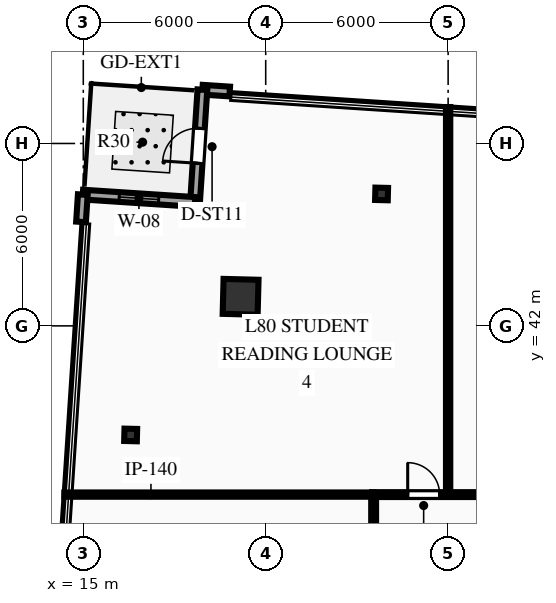
"""IFC4 building model, lengths in metres.
Left out: names, types, materials, properties, quantities, classifications, styles, units other than length and angle.
Written with IfcOpenShell. Run it as: python <this file> out.ifc"""

import sys

from ifc_helpers import new_model, si_unit, direction, frame, frame_2d, origin, origin_2d, place, context, subcontext, project, spatial, rectangle, hollow_rectangle, i_section, extrude, element, fill, save


model = new_model("IFC4")
c1 = context("Model", 3, precision=1e-05, world=origin(), true_north=direction((0.0, 1.0)))
c2 = subcontext(c1, "Body", "Model", "MODEL_VIEW")
j1 = project(units=[si_unit("LENGTHUNIT", "METRE"), si_unit("PLANEANGLEUNIT", "RADIAN")], contexts=[c1])
p1 = place(None, origin())
s1 = spatial("IfcSite", under=j1, at=p1, CompositionType="ELEMENT")
p2 = place(p1, origin())
s2 = spatial("IfcBuilding", under=s1, at=p2, CompositionType="ELEMENT")
p3 = place(p2, frame((0.0, 0.0, 317.7)))
s3 = spatial("IfcBuildingStorey", under=s2, at=p3, CompositionType="ELEMENT", Elevation=317.7)
p4 = place(p3, frame((20.174, 42.956, 0.0), z_axis=(0.0, 0.0, 1.0), x_axis=(0.025304572866, 0.999679788028, 0.0)))
e1 = element("IfcColumn", 1, at=p4, inside=s3, PredefinedType="COLUMN", context=c2, shape_type="SweptSolid", body=[
    extrude(hollow_rectangle(XDim=1.15, YDim=1.15, WallThickness=0.05, at=origin_2d()), origin(), (0.0, 0.0, 1.0), 3.75),
])
for number, where, z_axis, x_axis in (
    (2, (24.811, 46.34, 0.0), (0.0, 0.0, 1.0), (0.025, 1.0, 0.0)),
    (3, (16.558, 38.412, 0.0), (0.0, 0.0, 1.0), (0.025, 1.0, 0.0)),
):
    element("IfcColumn", number, at=place(p3, frame(where, z_axis=z_axis, x_axis=x_axis)), inside=s3, PredefinedType="COLUMN", context=c2, shape_type="SweptSolid", body=[
        extrude(i_section(OverallWidth=0.406, OverallDepth=0.416, WebThickness=0.03, FlangeThickness=0.048, at=origin_2d()), origin(), (0.0, 0.0, 1.0), 3.75),
    ])
p5 = place(p3, frame((18.918, 49.768, 0.0), z_axis=(0.0, 0.0, 1.0), x_axis=(0.997860142248, -0.065384528081, 0.0)))
e4 = element("IfcWall", 4, at=p5, inside=s3, PredefinedType="STANDARD", context=c2, shape_type="SweptSolid", body=[
    extrude(rectangle(XDim=0.9, YDim=0.32, at=frame_2d((0.45, 0.0))), origin(), (0.0, 0.0, 1.0), 3.49),
])
p6 = place(p3, frame((18.676, 46.076, 0.0), z_axis=(0.0, 0.0, 1.0), x_axis=(0.065454783575, 0.997855536291, 0.0)))
e5 = element("IfcWall", 5, at=p6, inside=s3, PredefinedType="STANDARD", context=c2, shape_type="SweptSolid", body=[
    extrude(rectangle(XDim=3.7, YDim=0.32, at=frame_2d((1.85, 0.0))), origin(), (0.0, 0.0, 1.0), 3.49),
])
p7 = place(p6, frame((1.275, 0.0, 0.0)))
e6 = element("IfcOpeningElement", 6, at=p7, cuts=e5, PredefinedType="OPENING", context=c2, shape_type="SweptSolid", body=[
    extrude(rectangle(XDim=1.15, YDim=2.2, at=frame_2d((0.575, 1.1))), frame((0.0, 0.17, 0.0), z_axis=(0.0, -1.0, 0.0), x_axis=(1.0, 0.0, 0.0)), (0.0, 0.0, 1.0), 0.34),
])
p8 = place(p3, frame((14.984, 46.318, 0.0), z_axis=(0.0, 0.0, 1.0), x_axis=(0.997855253572, -0.065459093476, 0.0)))
e7 = element("IfcWall", 7, at=p8, inside=s3, PredefinedType="STANDARD", context=c2, shape_type="SweptSolid", body=[
    extrude(rectangle(XDim=3.7, YDim=0.32, at=frame_2d((1.85, 0.0))), origin(), (0.0, 0.0, 1.0), 3.49),
])
p9 = place(p8, frame((1.2, 0.0, 0.85)))
e8 = element("IfcOpeningElement", 8, at=p9, cuts=e7, PredefinedType="OPENING", context=c2, shape_type="SweptSolid", body=[
    extrude(rectangle(XDim=1.3, YDim=1.9, at=frame_2d((0.65, 0.95))), frame((0.0, 0.17, 0.0), z_axis=(0.0, -1.0, 0.0), x_axis=(1.0, 0.0, 0.0)), (0.0, 0.0, 1.0), 0.34),
])
p10 = place(p3, frame((14.925, 45.42, 0.0), z_axis=(0.0, 0.0, 1.0), x_axis=(0.065366831665, 0.997861301644, 0.0)))
e9 = element("IfcWall", 9, at=p10, inside=s3, PredefinedType="STANDARD", context=c2, shape_type="SweptSolid", body=[
    extrude(rectangle(XDim=0.9, YDim=0.32, at=frame_2d((0.45, 0.0))), origin(), (0.0, 0.0, 1.0), 3.49),
])
p11 = place(p3, frame((24.5, 36.45, 0.0), z_axis=(0.0, 0.0, 1.0), x_axis=(1.0, 0.0, 0.0)))
e10 = element("IfcWall", 10, at=p11, inside=s3, PredefinedType="PARTITIONING", context=c2, shape_type="SweptSolid", body=[
    extrude(rectangle(XDim=10.25, YDim=0.16, at=frame_2d((5.125, 0.0))), origin(), (0.0, 0.0, 1.0), 3.49),
])
p12 = place(p11, frame((1.17, 0.0, 0.0)))
e11 = element("IfcOpeningElement", 11, at=p12, cuts=e10, PredefinedType="OPENING", context=c2, shape_type="SweptSolid", body=[
    extrude(rectangle(XDim=1.05, YDim=2.15, at=frame_2d((0.525, 1.075))), frame((0.0, 0.09, 0.0), z_axis=(0.0, -1.0, 0.0), x_axis=(1.0, 0.0, 0.0)), (0.0, 0.0, 1.0), 0.18),
])
p13 = place(p11, frame((5.279, 0.0, 0.0)))
e12 = element("IfcOpeningElement", 12, at=p13, cuts=e10, PredefinedType="OPENING", context=c2, shape_type="SweptSolid", body=[
    extrude(rectangle(XDim=1.05, YDim=2.15, at=frame_2d((0.525, 1.075))), frame((0.0, 0.09, 0.0), z_axis=(0.0, -1.0, 0.0), x_axis=(1.0, 0.0, 0.0)), (0.0, 0.0, 1.0), 0.18),
])
p14 = place(p3, frame((24.55, 27.25, 0.0), z_axis=(0.0, 0.0, 1.0), x_axis=(0.0, 1.0, 0.0)))
e13 = element("IfcWall", 13, at=p14, inside=s3, PredefinedType="PARTITIONING", context=c2, shape_type="SweptSolid", body=[
    extrude(rectangle(XDim=9.2, YDim=0.16, at=frame_2d((4.6, 0.0))), origin(), (0.0, 0.0, 1.0), 3.49),
])
p15 = place(p14, frame((3.42, 0.0, 0.0)))
e14 = element("IfcOpeningElement", 14, at=p15, cuts=e13, PredefinedType="OPENING", context=c2, shape_type="SweptSolid", body=[
    extrude(rectangle(XDim=1.05, YDim=2.15, at=frame_2d((0.525, 1.075))), frame((0.0, 0.09, 0.0), z_axis=(0.0, -1.0, 0.0), x_axis=(1.0, 0.0, 0.0)), (0.0, 0.0, 1.0), 0.18),
])
p16 = place(p14, frame((5.423, 0.0, 0.0)))
e15 = element("IfcOpeningElement", 15, at=p16, cuts=e13, PredefinedType="OPENING", context=c2, shape_type="SweptSolid", body=[
    extrude(rectangle(XDim=1.05, YDim=2.15, at=frame_2d((0.525, 1.075))), frame((0.0, 0.09, 0.0), z_axis=(0.0, -1.0, 0.0), x_axis=(1.0, 0.0, 0.0)), (0.0, 0.0, 1.0), 0.18),
])
p17 = place(p3, frame((14.377, 36.45, 0.0), z_axis=(0.0, 0.0, 1.0), x_axis=(1.0, 0.0, 0.0)))
e16 = element("IfcWall", 16, at=p17, inside=s3, PredefinedType="PARTITIONING", context=c2, shape_type="SweptSolid", body=[
    extrude(rectangle(XDim=10.173, YDim=0.14, at=frame_2d((5.086, 0.0))), origin(), (0.0, 0.0, 1.0), 2.868),
])
p18 = place(p3, frame((27.0, 36.45, 0.0), z_axis=(0.0, 0.0, 1.0), x_axis=(0.0, 1.0, 0.0)))
e17 = element("IfcWall", 17, at=p18, inside=s3, PredefinedType="PARTITIONING", context=c2, shape_type="SweptSolid", body=[
    extrude(rectangle(XDim=12.748, YDim=0.14, at=frame_2d((6.374, 0.0))), origin(), (0.0, 0.0, 1.0), 3.49),
])
p19 = place(p7, origin())
e18 = element("IfcDoor", 18, at=p19, inside=s3, OperationType="SINGLE_SWING_LEFT", PredefinedType="DOOR", context=c2, shape_type="SweptSolid", body=[
    extrude(rectangle(XDim=1.15, YDim=2.2, at=frame_2d((0.575, 1.1))), frame((0.0, 0.025, 0.0), z_axis=(0.0, -1.0, 0.0), x_axis=(1.0, 0.0, 0.0)), (0.0, 0.0, 1.0), 0.05),
])
fill(e6, e18)
p20 = place(p9, origin())
e19 = element("IfcWindow", 19, at=p20, inside=s3, PartitioningType="SINGLE_PANEL", PredefinedType="WINDOW", context=c2, shape_type="SweptSolid", body=[
    extrude(rectangle(XDim=1.3, YDim=1.9, at=frame_2d((0.65, 0.95))), frame((0.0, 0.03, 0.0), z_axis=(0.0, -1.0, 0.0), x_axis=(1.0, 0.0, 0.0)), (0.0, 0.0, 1.0), 0.06),
])
fill(e8, e19)
p21 = place(p12, origin())
e20 = element("IfcDoor", 20, at=p21, inside=s3, OperationType="SINGLE_SWING_LEFT", PredefinedType="DOOR", context=c2, shape_type="SweptSolid", body=[
    extrude(rectangle(XDim=1.05, YDim=2.15, at=frame_2d((0.525, 1.075))), frame((0.0, 0.025, 0.0), z_axis=(0.0, -1.0, 0.0), x_axis=(1.0, 0.0, 0.0)), (0.0, 0.0, 1.0), 0.05),
])
fill(e11, e20)
save(model, sys.argv[1])
